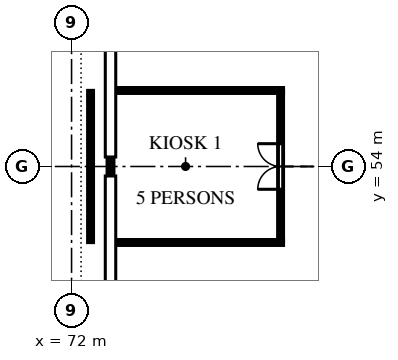
"""IFC4 building model, lengths in metres.
Left out: names, types, materials, properties, quantities, classifications, styles, units other than length and angle.
Written with IfcOpenShell. Run it as: python <this file> out.ifc"""

import sys

from ifc_helpers import new_model, si_unit, direction, frame, frame_2d, origin, place, context, subcontext, project, spatial, polyline, rectangle, outline, extrude, element, fill, save


model = new_model("IFC4")
c1 = context("Model", 3, precision=1e-05, world=origin(), true_north=direction((0.0, 1.0)))
c2 = subcontext(c1, "Body", "Model", "MODEL_VIEW")
j1 = project(units=[si_unit("LENGTHUNIT", "METRE"), si_unit("PLANEANGLEUNIT", "RADIAN")], contexts=[c1])
p1 = place(None, origin())
s1 = spatial("IfcSite", under=j1, at=p1, CompositionType="ELEMENT")
p2 = place(p1, origin())
s2 = spatial("IfcBuilding", under=s1, at=p2, CompositionType="ELEMENT")
p3 = place(p2, frame((0.0, 0.0, 7.5)))
s3 = spatial("IfcBuildingStorey", under=s2, at=p3, CompositionType="ELEMENT", Elevation=7.5)
p4 = place(p3, frame((73.025, 53.75, 0.0), z_axis=(0.0, 0.0, 1.0), x_axis=(0.0, 1.0, 0.0)))
e1 = element("IfcWall", 1, at=p4, inside=s3, PredefinedType="SOLIDWALL", context=c2, shape_type="SweptSolid", body=[
    extrude(rectangle(XDim=0.5, YDim=0.1, at=frame_2d((0.25, 0.0))), origin(), (0.0, 0.0, 1.0), 3.288),
])
p5 = place(p3, frame((77.5, 52.038, 0.0), z_axis=(0.0, 0.0, 1.0), x_axis=(0.0, 1.0, 0.0)))
e2 = element("IfcWall", 2, at=p5, inside=s3, PredefinedType="PARTITIONING", context=c2, shape_type="SweptSolid", body=[
    extrude(rectangle(XDim=3.925, YDim=0.075, at=frame_2d((1.962, 0.0))), origin(), (0.0, 0.0, 1.0), 3.287),
])
p6 = place(p5, frame((1.363, 0.0, 0.0)))
e3 = element("IfcOpeningElement", 3, at=p6, cuts=e2, PredefinedType="OPENING", context=c2, shape_type="SweptSolid", body=[
    extrude(rectangle(XDim=1.2, YDim=2.1, at=frame_2d((0.6, 1.05))), frame((0.0, 0.047, 0.0), z_axis=(0.0, -1.0, 0.0), x_axis=(1.0, 0.0, 0.0)), (0.0, 0.0, 1.0), 0.095),
])
p7 = place(p3, frame((77.538, 56.0, 0.0), z_axis=(0.0, 0.0, 1.0), x_axis=(-1.0, 0.0, 0.0)))
e4 = element("IfcWall", 4, at=p7, inside=s3, PredefinedType="PARTITIONING", context=c2, shape_type="SweptSolid", body=[
    extrude(rectangle(XDim=4.413, YDim=0.075, at=frame_2d((2.206, 0.0))), origin(), (0.0, 0.0, 1.0), 3.287),
])
p8 = place(p3, frame((72.5, 55.962, 0.0), z_axis=(0.0, 0.0, 1.0), x_axis=(0.0, -1.0, 0.0)))
e5 = element("IfcWall", 5, at=p8, inside=s3, PredefinedType="PARTITIONING", context=c2, shape_type="SweptSolid", body=[
    extrude(rectangle(XDim=3.925, YDim=0.075, at=frame_2d((1.962, 0.0))), origin(), (0.0, 0.0, 1.0), 3.287),
])
p9 = place(p3, frame((73.125, 52.0, 0.0), z_axis=(0.0, 0.0, 1.0), x_axis=(1.0, 0.0, 0.0)))
e6 = element("IfcWall", 6, at=p9, inside=s3, PredefinedType="PARTITIONING", context=c2, shape_type="SweptSolid", body=[
    extrude(rectangle(XDim=4.413, YDim=0.075, at=frame_2d((2.206, 0.0))), origin(), (0.0, 0.0, 1.0), 3.287),
])
p10 = place(p6, origin())
e7 = element("IfcDoor", 7, at=p10, inside=s3, OperationType="DOUBLE_DOOR_SINGLE_SWING", PredefinedType="DOOR", context=c2, shape_type="SweptSolid", body=[
    extrude(outline(polyline([(0.0, 0.0), (0.07, 0.0), (0.07, 2.03), (1.13, 2.03), (1.13, 0.0), (1.2, 0.0), (1.2, 2.1), (0.0, 2.1), (0.0, 0.0)])), frame((0.0, 0.025, 0.0), z_axis=(0.0, -1.0, 0.0), x_axis=(1.0, 0.0, 0.0)), (0.0, 0.0, 1.0), 0.05),
    extrude(outline(polyline([(0.074, 0.01), (0.597, 0.01), (0.597, 2.026), (0.074, 2.026), (0.074, 0.01)]), holes=[polyline([(0.178, 0.373), (0.492, 0.373), (0.492, 1.784), (0.178, 1.784), (0.178, 0.373)])]), frame((0.0, 0.017, 0.0), z_axis=(0.0, -1.0, 0.0), x_axis=(1.0, 0.0, 0.0)), (0.0, 0.0, 1.0), 0.035),
    extrude(rectangle(XDim=0.314, YDim=1.411, at=frame_2d((0.335, 1.079))), frame((0.0, 0.009, 0.0), z_axis=(0.0, -1.0, 0.0), x_axis=(1.0, 0.0, 0.0)), (0.0, 0.0, 1.0), 0.017),
    extrude(outline(polyline([(0.603, 0.01), (1.126, 0.01), (1.126, 2.026), (0.603, 2.026), (0.603, 0.01)]), holes=[polyline([(0.708, 0.373), (1.021, 0.373), (1.021, 1.784), (0.708, 1.784), (0.708, 0.373)])]), frame((0.0, 0.017, 0.0), z_axis=(0.0, -1.0, 0.0), x_axis=(1.0, 0.0, 0.0)), (0.0, 0.0, 1.0), 0.035),
    extrude(rectangle(XDim=0.314, YDim=1.411, at=frame_2d((0.865, 1.079))), frame((0.0, 0.009, 0.0), z_axis=(0.0, -1.0, 0.0), x_axis=(1.0, 0.0, 0.0)), (0.0, 0.0, 1.0), 0.017),
])
fill(e3, e7)
save(model, sys.argv[1])
